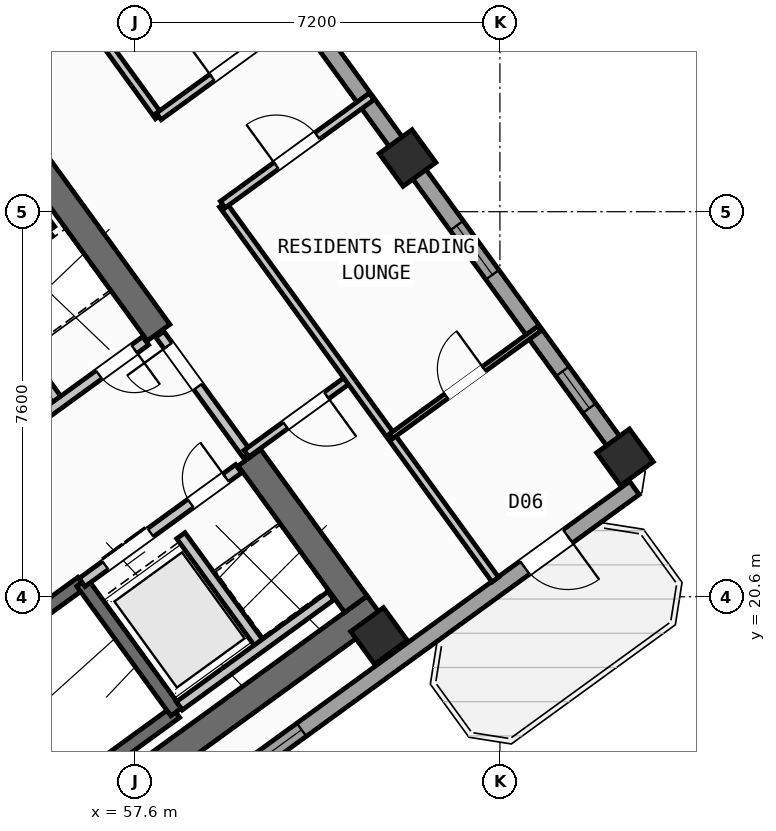
"""IFC4 building model, lengths in metres.
Left out: names, types, materials, properties, quantities, classifications, styles, units other than length and angle.
Written with IfcOpenShell. Run it as: python <this file> out.ifc"""

import sys

from ifc_helpers import new_model, si_unit, direction, frame, frame_2d, origin, origin_2d, place, context, subcontext, project, spatial, rectangle, hollow_rectangle, extrude, source, transform, mapped, element, fill, save


model = new_model("IFC4")
c1 = context("Model", 3, precision=1e-05, world=origin(), true_north=direction((0.0, 1.0)))
c2 = subcontext(c1, "Body", "Model", "MODEL_VIEW")
j1 = project(units=[si_unit("LENGTHUNIT", "METRE"), si_unit("PLANEANGLEUNIT", "RADIAN")], contexts=[c1])
p1 = place(None, origin())
s1 = spatial("IfcSite", under=j1, at=p1, CompositionType="ELEMENT")
p2 = place(p1, origin())
s2 = spatial("IfcBuilding", under=s1, at=p2, CompositionType="ELEMENT")
p3 = place(p2, frame((0.0, 0.0, 191.4)))
s3 = spatial("IfcBuildingStorey", under=s2, at=p3, CompositionType="ELEMENT", Elevation=191.4)
p4 = place(p3, frame((52.359, 13.14, 0.0), z_axis=(0.0, 0.0, 1.0), x_axis=(0.809014896919, 0.587788139183, 0.0)))
e1 = element("IfcWall", 1, at=p4, inside=s3, PredefinedType="SHEAR", context=c2, shape_type="SweptSolid", body=[
    extrude(rectangle(XDim=12.34, YDim=0.55, at=frame_2d((6.17, 0.0))), origin(), (0.0, 0.0, 1.0), 3.32),
])
p5 = place(p3, frame((61.958, 20.454, 0.0), z_axis=(0.0, 0.0, 1.0), x_axis=(-0.587802113096, 0.809004744015, 0.0)))
e2 = element("IfcWall", 2, at=p5, inside=s3, PredefinedType="SHEAR", context=c2, shape_type="SweptSolid", body=[
    extrude(rectangle(XDim=3.575, YDim=0.55, at=frame_2d((1.788, 0.0))), origin(), (0.0, 0.0, 1.0), 3.32),
])
p6 = place(p3, frame((58.064, 25.813, 0.0), z_axis=(0.0, 0.0, 1.0), x_axis=(-0.587764933797, 0.809031756236, 0.0)))
e3 = element("IfcWall", 3, at=p6, inside=s3, PredefinedType="SHEAR", context=c2, shape_type="SweptSolid", body=[
    extrude(rectangle(XDim=6.425, YDim=0.55, at=frame_2d((3.212, 0.0))), origin(), (0.0, 0.0, 1.0), 3.32),
])
m1 = source(origin(), c2, "Body", "SweptSolid", [
    extrude(hollow_rectangle(XDim=0.8, YDim=0.8, WallThickness=0.032, at=origin_2d()), origin(), (0.0, 0.0, 1.0), 3.6),
])
for number, where, z_axis, x_axis in (
    (4, (62.414, 19.827, 0.0), (0.0, 0.0, 1.0), (0.809, 0.588, 0.0)),
    (5, (67.268, 23.354, 0.0), (0.0, 0.0, 1.0), (0.809, 0.588, 0.0)),
    (6, (62.977, 29.259, 0.0), (0.0, 0.0, 1.0), (0.809, 0.588, 0.0)),
):
    element("IfcColumn", number, at=place(p3, frame(where, z_axis=z_axis, x_axis=x_axis)), inside=s3, PredefinedType="COLUMN", context=c2, shape_type="MappedRepresentation", body=[
        mapped(m1, transform((0.0, 0.0, 0.0), scale=1.0)),
    ])
p7 = place(p3, frame((54.81, 40.5, 0.0), z_axis=(0.0, 0.0, 1.0), x_axis=(0.587783625747, -0.809018176127, 0.0)))
e7 = element("IfcWall", 7, at=p7, inside=s3, PredefinedType="STANDARD", context=c2, shape_type="SweptSolid", body=[
    extrude(rectangle(XDim=21.587, YDim=0.32, at=frame_2d((10.794, 0.0))), origin(), (0.0, 0.0, 1.0), 2.795),
])
p8 = place(p7, frame((1.328, 0.0, 0.85)))
e8 = element("IfcOpeningElement", 8, at=p8, cuts=e7, PredefinedType="OPENING", context=c2, shape_type="SweptSolid", body=[
    extrude(rectangle(XDim=1.8, YDim=1.5, at=frame_2d((0.9, 0.75))), frame((0.0, 0.17, 0.0), z_axis=(0.0, -1.0, 0.0), x_axis=(1.0, 0.0, 0.0)), (0.0, 0.0, 1.0), 0.34),
])
p9 = place(p7, frame((4.695, 0.0, 1.0)))
e9 = element("IfcOpeningElement", 9, at=p9, cuts=e7, PredefinedType="OPENING", context=c2, shape_type="SweptSolid", body=[
    extrude(rectangle(XDim=0.9, YDim=1.25, at=frame_2d((0.45, 0.625))), frame((0.0, 0.17, 0.0), z_axis=(0.0, -1.0, 0.0), x_axis=(1.0, 0.0, 0.0)), (0.0, 0.0, 1.0), 0.34),
])
p10 = place(p7, frame((7.829, 0.0, 0.85)))
e10 = element("IfcOpeningElement", 10, at=p10, cuts=e7, PredefinedType="OPENING", context=c2, shape_type="SweptSolid", body=[
    extrude(rectangle(XDim=1.5, YDim=1.5, at=frame_2d((0.75, 0.75))), frame((0.0, 0.17, 0.0), z_axis=(0.0, -1.0, 0.0), x_axis=(1.0, 0.0, 0.0)), (0.0, 0.0, 1.0), 0.34),
])
p11 = place(p7, frame((15.542, 0.0, 0.95)))
e11 = element("IfcOpeningElement", 11, at=p11, cuts=e7, PredefinedType="OPENING", context=c2, shape_type="SweptSolid", body=[
    extrude(rectangle(XDim=1.2, YDim=1.4, at=frame_2d((0.6, 0.7))), frame((0.0, 0.17, 0.0), z_axis=(0.0, -1.0, 0.0), x_axis=(1.0, 0.0, 0.0)), (0.0, 0.0, 1.0), 0.34),
])
p12 = place(p7, frame((19.097, 0.0, 1.0)))
e12 = element("IfcOpeningElement", 12, at=p12, cuts=e7, PredefinedType="OPENING", context=c2, shape_type="SweptSolid", body=[
    extrude(rectangle(XDim=0.9, YDim=1.25, at=frame_2d((0.45, 0.625))), frame((0.0, 0.17, 0.0), z_axis=(0.0, -1.0, 0.0), x_axis=(1.0, 0.0, 0.0)), (0.0, 0.0, 1.0), 0.34),
])
p13 = place(p3, frame((67.454, 22.747, 0.0), z_axis=(0.0, 0.0, 1.0), x_axis=(-0.809021120468, -0.587779573171, 0.0)))
e13 = element("IfcWall", 13, at=p13, inside=s3, PredefinedType="STANDARD", context=c2, shape_type="SweptSolid", body=[
    extrude(rectangle(XDim=17.588, YDim=0.32, at=frame_2d((8.794, 0.0))), origin(), (0.0, 0.0, 1.0), 3.32),
])
p14 = place(p13, frame((1.624, 0.0, 0.0)))
e14 = element("IfcOpeningElement", 14, at=p14, cuts=e13, PredefinedType="OPENING", context=c2, shape_type="SweptSolid", body=[
    extrude(rectangle(XDim=1.05, YDim=2.15, at=frame_2d((0.525, 1.075))), frame((0.0, 0.17, 0.0), z_axis=(0.0, -1.0, 0.0), x_axis=(1.0, 0.0, 0.0)), (0.0, 0.0, 1.0), 0.34),
])
p15 = place(p13, frame((8.119, 0.0, 0.8)))
e15 = element("IfcOpeningElement", 15, at=p15, cuts=e13, PredefinedType="OPENING", context=c2, shape_type="SweptSolid", body=[
    extrude(rectangle(XDim=2.1, YDim=1.55, at=frame_2d((1.05, 0.775))), frame((0.0, 0.17, 0.0), z_axis=(0.0, -1.0, 0.0), x_axis=(1.0, 0.0, 0.0)), (0.0, 0.0, 1.0), 0.34),
])
p16 = place(p13, frame((13.369, 0.0, 0.8)))
e16 = element("IfcOpeningElement", 16, at=p16, cuts=e13, PredefinedType="OPENING", context=c2, shape_type="SweptSolid", body=[
    extrude(rectangle(XDim=2.1, YDim=1.55, at=frame_2d((1.05, 0.775))), frame((0.0, 0.17, 0.0), z_axis=(0.0, -1.0, 0.0), x_axis=(1.0, 0.0, 0.0)), (0.0, 0.0, 1.0), 0.34),
])
p17 = place(p3, frame((49.863, 23.44, 0.0), z_axis=(0.0, 0.0, 1.0), x_axis=(0.809003474932, 0.587803859759, 0.0)))
e17 = element("IfcWall", 17, at=p17, inside=s3, PredefinedType="SHEAR", context=c2, shape_type="SweptSolid", body=[
    extrude(rectangle(XDim=7.46, YDim=0.26, at=frame_2d((3.73, 0.0))), origin(), (0.0, 0.0, 1.0), 3.32),
])
p18 = place(p17, frame((0.36, 0.0, 0.0)))
e18 = element("IfcOpeningElement", 18, at=p18, cuts=e17, PredefinedType="OPENING", context=c2, shape_type="SweptSolid", body=[
    extrude(rectangle(XDim=0.86, YDim=2.05, at=frame_2d((0.43, 1.025))), frame((0.0, 0.14, 0.0), z_axis=(0.0, -1.0, 0.0), x_axis=(1.0, 0.0, 0.0)), (0.0, 0.0, 1.0), 0.28),
])
p19 = place(p3, frame((55.906, 27.831, 0.0), z_axis=(0.0, 0.0, 1.0), x_axis=(-0.587804123638, 0.809003283204, 0.0)))
e19 = element("IfcWall", 19, at=p19, inside=s3, PredefinedType="SHEAR", context=c2, shape_type="SweptSolid", body=[
    extrude(rectangle(XDim=3.16, YDim=0.26, at=frame_2d((1.58, 0.0))), origin(), (0.0, 0.0, 1.0), 3.32),
])
p20 = place(p3, frame((52.472, 14.013, 0.0), z_axis=(0.0, 0.0, 1.0), x_axis=(0.809028366311, 0.587769599847, 0.0)))
e20 = element("IfcWall", 20, at=p20, inside=s3, PredefinedType="SHEAR", context=c2, shape_type="SweptSolid", body=[
    extrude(rectangle(XDim=7.33, YDim=0.26, at=frame_2d((3.665, 0.0))), origin(), (0.0, 0.0, 1.0), 3.32),
])
p21 = place(p3, frame((50.615, 16.57, 0.0), z_axis=(0.0, 0.0, 1.0), x_axis=(0.809028366311, 0.587769599847, 0.0)))
e21 = element("IfcWall", 21, at=p21, inside=s3, PredefinedType="SHEAR", context=c2, shape_type="SweptSolid", body=[
    extrude(rectangle(XDim=7.33, YDim=0.26, at=frame_2d((3.665, 0.0))), origin(), (0.0, 0.0, 1.0), 3.32),
])
p22 = place(p21, frame((0.22, 0.0, 0.0)))
e22 = element("IfcOpeningElement", 22, at=p22, cuts=e21, PredefinedType="OPENING", context=c2, shape_type="SweptSolid", body=[
    extrude(rectangle(XDim=1.1, YDim=2.1, at=frame_2d((0.55, 1.05))), frame((0.0, 0.14, 0.0), z_axis=(0.0, -1.0, 0.0), x_axis=(1.0, 0.0, 0.0)), (0.0, 0.0, 1.0), 0.28),
])
p23 = place(p3, frame((58.41, 18.327, 0.0), z_axis=(0.0, 0.0, 1.0), x_axis=(-0.58776738483, 0.809029975545, 0.0)))
e23 = element("IfcWall", 23, at=p23, inside=s3, PredefinedType="SHEAR", context=c2, shape_type="SweptSolid", body=[
    extrude(rectangle(XDim=3.16, YDim=0.26, at=frame_2d((1.58, 0.0))), origin(), (0.0, 0.0, 1.0), 3.32),
])
p24 = place(p3, frame((56.553, 20.884, 0.0), z_axis=(0.0, 0.0, 1.0), x_axis=(0.809023564264, 0.58777620951, 0.0)))
e24 = element("IfcWall", 24, at=p24, inside=s3, PredefinedType="STANDARD", context=c2, shape_type="SweptSolid", body=[
    extrude(rectangle(XDim=3.818, YDim=0.2, at=frame_2d((1.909, 0.0))), origin(), (0.0, 0.0, 1.0), 3.31),
])
p25 = place(p24, frame((0.57, 0.0, 0.0)))
e25 = element("IfcOpeningElement", 25, at=p25, cuts=e24, PredefinedType="OPENING", context=c2, shape_type="SweptSolid", body=[
    extrude(rectangle(XDim=1.1, YDim=2.15, at=frame_2d((0.55, 1.075))), frame((0.0, 0.11, 0.0), z_axis=(0.0, -1.0, 0.0), x_axis=(1.0, 0.0, 0.0)), (0.0, 0.0, 1.0), 0.22),
])
p26 = place(p24, frame((2.65, 0.0, 0.0)))
e26 = element("IfcOpeningElement", 26, at=p26, cuts=e24, PredefinedType="OPENING", context=c2, shape_type="SweptSolid", body=[
    extrude(rectangle(XDim=0.86, YDim=2.05, at=frame_2d((0.43, 1.025))), frame((0.0, 0.11, 0.0), z_axis=(0.0, -1.0, 0.0), x_axis=(1.0, 0.0, 0.0)), (0.0, 0.0, 1.0), 0.22),
])
p27 = place(p3, frame((60.067, 19.655, 0.0), z_axis=(0.0, 0.0, 1.0), x_axis=(-0.587800520745, 0.809005900975, 0.0)))
e27 = element("IfcWall", 27, at=p27, inside=s3, PredefinedType="STANDARD", context=c2, shape_type="SweptSolid", body=[
    extrude(rectangle(XDim=2.66, YDim=0.2, at=frame_2d((1.33, 0.0))), origin(), (0.0, 0.0, 1.0), 3.31),
])
p28 = place(p3, frame((58.472, 18.447, 0.0), z_axis=(0.0, 0.0, 1.0), x_axis=(0.809018631237, 0.587782999339, 0.0)))
e28 = element("IfcWall", 28, at=p28, inside=s3, PredefinedType="STANDARD", context=c2, shape_type="SweptSolid", body=[
    extrude(rectangle(XDim=3.698, YDim=0.2, at=frame_2d((1.849, 0.0))), origin(), (0.0, 0.0, 1.0), 3.31),
])
p29 = place(p3, frame((56.111, 24.419, 0.0), z_axis=(0.0, 0.0, 1.0), x_axis=(-0.58777848983, 0.809021907548, 0.0)))
e29 = element("IfcWall", 29, at=p29, inside=s3, PredefinedType="STANDARD", context=c2, shape_type="SweptSolid", body=[
    extrude(rectangle(XDim=2.88, YDim=0.2, at=frame_2d((1.44, 0.0))), origin(), (0.0, 0.0, 1.0), 3.31),
])
p30 = place(p3, frame((53.425, 22.468, 0.0), z_axis=(0.0, 0.0, 1.0), x_axis=(0.809024377198, 0.587775090574, 0.0)))
e30 = element("IfcWall", 30, at=p30, inside=s3, PredefinedType="STANDARD", context=c2, shape_type="SweptSolid", body=[
    extrude(rectangle(XDim=5.418, YDim=0.2, at=frame_2d((2.709, 0.0))), origin(), (0.0, 0.0, 1.0), 3.31),
])
p31 = place(p30, frame((4.28, 0.0, 0.0)))
e31 = element("IfcOpeningElement", 31, at=p31, cuts=e30, PredefinedType="OPENING", context=c2, shape_type="SweptSolid", body=[
    extrude(rectangle(XDim=0.86, YDim=2.05, at=frame_2d((0.43, 1.025))), frame((0.0, 0.11, 0.0), z_axis=(0.0, -1.0, 0.0), x_axis=(1.0, 0.0, 0.0)), (0.0, 0.0, 1.0), 0.22),
])
p32 = place(p30, frame((1.45, 0.0, 0.0)))
e32 = element("IfcOpeningElement", 32, at=p32, cuts=e30, PredefinedType="OPENING", context=c2, shape_type="SweptSolid", body=[
    extrude(rectangle(XDim=0.86, YDim=2.05, at=frame_2d((0.43, 1.025))), frame((0.0, 0.11, 0.0), z_axis=(0.0, -1.0, 0.0), x_axis=(1.0, 0.0, 0.0)), (0.0, 0.0, 1.0), 0.22),
])
p33 = place(p3, frame((59.827, 23.386, 0.0), z_axis=(0.0, 0.0, 1.0), x_axis=(-0.587803840107, 0.809003489211, 0.0)))
e33 = element("IfcWall", 33, at=p33, inside=s3, PredefinedType="STANDARD", context=c2, shape_type="SweptSolid", body=[
    extrude(rectangle(XDim=2.96, YDim=0.2, at=frame_2d((1.48, 0.0))), origin(), (0.0, 0.0, 1.0), 3.31),
])
p34 = place(p33, frame((1.68, 0.0, 0.0)))
e34 = element("IfcOpeningElement", 34, at=p34, cuts=e33, PredefinedType="OPENING", context=c2, shape_type="SweptSolid", body=[
    extrude(rectangle(XDim=1.0, YDim=2.1, at=frame_2d((0.5, 1.05))), frame((0.0, 0.11, 0.0), z_axis=(0.0, -1.0, 0.0), x_axis=(1.0, 0.0, 0.0)), (0.0, 0.0, 1.0), 0.22),
])
p35 = place(p3, frame((59.798, 23.427, 0.0), z_axis=(0.0, 0.0, 1.0), x_axis=(0.809034604122, 0.587761013791, 0.0)))
e35 = element("IfcWall", 35, at=p35, inside=s3, PredefinedType="PARTITIONING", context=c2, shape_type="SweptSolid", body=[
    extrude(rectangle(XDim=2.51, YDim=0.16, at=frame_2d((1.255, 0.0))), origin(), (0.0, 0.0, 1.0), 3.31),
])
p36 = place(p35, frame((0.95, 0.0, 0.0)))
e36 = element("IfcOpeningElement", 36, at=p36, cuts=e35, PredefinedType="OPENING", context=c2, shape_type="SweptSolid", body=[
    extrude(rectangle(XDim=1.0, YDim=2.1, at=frame_2d((0.5, 1.05))), frame((0.0, 0.09, 0.0), z_axis=(0.0, -1.0, 0.0), x_axis=(1.0, 0.0, 0.0)), (0.0, 0.0, 1.0), 0.18),
])
p37 = place(p3, frame((64.709, 20.938, 0.0), z_axis=(0.0, 0.0, 1.0), x_axis=(-0.587776590479, 0.80902328748, 0.0)))
e37 = element("IfcWall", 37, at=p37, inside=s3, PredefinedType="PARTITIONING", context=c2, shape_type="SweptSolid", body=[
    extrude(rectangle(XDim=9.15, YDim=0.16, at=frame_2d((4.575, 0.0))), origin(), (0.0, 0.0, 1.0), 3.31),
])
p38 = place(p3, frame((58.067, 30.08, 0.0), z_axis=(0.0, 0.0, 1.0), x_axis=(-0.587787785243, 0.809015154073, 0.0)))
e38 = element("IfcWall", 38, at=p38, inside=s3, PredefinedType="PARTITIONING", context=c2, shape_type="SweptSolid", body=[
    extrude(rectangle(XDim=10.4, YDim=0.16, at=frame_2d((5.2, 0.0))), origin(), (0.0, 0.0, 1.0), 3.31),
])
p39 = place(p3, frame((59.331, 28.341, 0.0), z_axis=(0.0, 0.0, 1.0), x_axis=(0.809003564202, 0.587803736896, 0.0)))
e39 = element("IfcWall", 39, at=p39, inside=s3, PredefinedType="PARTITIONING", context=c2, shape_type="SweptSolid", body=[
    extrude(rectangle(XDim=3.63, YDim=0.16, at=frame_2d((1.815, 0.0))), origin(), (0.0, 0.0, 1.0), 3.31),
])
p40 = place(p39, frame((1.305, 0.0, 0.0)))
e40 = element("IfcOpeningElement", 40, at=p40, cuts=e39, PredefinedType="OPENING", context=c2, shape_type="SweptSolid", body=[
    extrude(rectangle(XDim=1.0, YDim=2.1, at=frame_2d((0.5, 1.05))), frame((0.0, 0.09, 0.0), z_axis=(0.0, -1.0, 0.0), x_axis=(1.0, 0.0, 0.0)), (0.0, 0.0, 1.0), 0.18),
])
p41 = place(p3, frame((58.067, 30.08, 0.0), z_axis=(0.0, 0.0, 1.0), x_axis=(0.809012309495, 0.587791700422, 0.0)))
e41 = element("IfcWall", 41, at=p41, inside=s3, PredefinedType="PARTITIONING", context=c2, shape_type="SweptSolid", body=[
    extrude(rectangle(XDim=3.63, YDim=0.16, at=frame_2d((1.815, 0.0))), origin(), (0.0, 0.0, 1.0), 3.31),
])
p42 = place(p41, frame((1.305, 0.0, 0.0)))
e42 = element("IfcOpeningElement", 42, at=p42, cuts=e41, PredefinedType="OPENING", context=c2, shape_type="SweptSolid", body=[
    extrude(rectangle(XDim=1.0, YDim=2.1, at=frame_2d((0.5, 1.05))), frame((0.0, 0.09, 0.0), z_axis=(0.0, -1.0, 0.0), x_axis=(1.0, 0.0, 0.0)), (0.0, 0.0, 1.0), 0.18),
])
p43 = place(p3, frame((62.653, 23.768, 0.0), z_axis=(0.0, 0.0, 1.0), x_axis=(0.809037198293, 0.58775744298, 0.0)))
e43 = element("IfcWall", 43, at=p43, inside=s3, PredefinedType="PARTITIONING", context=c2, shape_type="SweptSolid", body=[
    extrude(rectangle(XDim=3.61, YDim=0.11, at=frame_2d((1.805, 0.0))), origin(), (0.0, 0.0, 1.0), 3.31),
])
p44 = place(p43, frame((1.345, 0.0, 0.0)))
e44 = element("IfcOpeningElement", 44, at=p44, cuts=e43, PredefinedType="OPENING", context=c2, shape_type="SweptSolid", body=[
    extrude(rectangle(XDim=0.92, YDim=2.08, at=frame_2d((0.46, 1.04))), frame((0.0, 0.065, 0.0), z_axis=(0.0, -1.0, 0.0), x_axis=(1.0, 0.0, 0.0)), (0.0, 0.0, 1.0), 0.13),
])
m2 = source(origin(), c2, "Body", "SweptSolid", [
    extrude(rectangle(XDim=1.05, YDim=2.15, at=frame_2d((0.525, 1.075))), frame((0.0, 0.025, 0.0), z_axis=(0.0, -1.0, 0.0), x_axis=(1.0, 0.0, 0.0)), (0.0, 0.0, 1.0), 0.05),
])
p45 = place(p14, origin())
e45 = element("IfcDoor", 45, at=p45, inside=s3, OperationType="SINGLE_SWING_LEFT", PredefinedType="DOOR", context=c2, shape_type="MappedRepresentation", body=[
    mapped(m2, transform((0.0, 0.0, 0.0), scale=1.0)),
])
fill(e14, e45)
m3 = source(origin(), c2, "Body", "SweptSolid", [
    extrude(rectangle(XDim=1.2, YDim=1.4, at=frame_2d((0.6, 0.7))), frame((0.0, 0.03, 0.0), z_axis=(0.0, -1.0, 0.0), x_axis=(1.0, 0.0, 0.0)), (0.0, 0.0, 1.0), 0.06),
])
p46 = place(p11, origin())
e46 = element("IfcWindow", 46, at=p46, inside=s3, PartitioningType="SINGLE_PANEL", PredefinedType="WINDOW", context=c2, shape_type="MappedRepresentation", body=[
    mapped(m3, transform((0.0, 0.0, 0.0), scale=1.0)),
])
fill(e11, e46)
m4 = source(origin(), c2, "Body", "SweptSolid", [
    extrude(rectangle(XDim=0.9, YDim=1.25, at=frame_2d((0.45, 0.625))), frame((0.0, 0.03, 0.0), z_axis=(0.0, -1.0, 0.0), x_axis=(1.0, 0.0, 0.0)), (0.0, 0.0, 1.0), 0.06),
])
p47 = place(p12, origin())
e47 = element("IfcWindow", 47, at=p47, inside=s3, PartitioningType="SINGLE_PANEL", PredefinedType="WINDOW", context=c2, shape_type="MappedRepresentation", body=[
    mapped(m4, transform((0.0, 0.0, 0.0), scale=1.0)),
])
fill(e12, e47)
m5 = source(origin(), c2, "Body", "SweptSolid", [
    extrude(rectangle(XDim=2.1, YDim=1.55, at=frame_2d((1.05, 0.775))), frame((0.0, 0.03, 0.0), z_axis=(0.0, -1.0, 0.0), x_axis=(1.0, 0.0, 0.0)), (0.0, 0.0, 1.0), 0.06),
])
p48 = place(p15, origin())
e48 = element("IfcWindow", 48, at=p48, inside=s3, PartitioningType="SINGLE_PANEL", PredefinedType="WINDOW", context=c2, shape_type="MappedRepresentation", body=[
    mapped(m5, transform((0.0, 0.0, 0.0), scale=1.0)),
])
fill(e15, e48)
m6 = source(origin(), c2, "Body", "SweptSolid", [
    extrude(rectangle(XDim=1.1, YDim=2.15, at=frame_2d((0.55, 1.075))), frame((0.0, 0.025, 0.0), z_axis=(0.0, -1.0, 0.0), x_axis=(1.0, 0.0, 0.0)), (0.0, 0.0, 1.0), 0.05),
])
p49 = place(p25, origin())
e49 = element("IfcDoor", 49, at=p49, inside=s3, OperationType="DOUBLE_DOOR_SLIDING", PredefinedType="DOOR", context=c2, shape_type="MappedRepresentation", body=[
    mapped(m6, transform((0.0, 0.0, 0.0), scale=1.0)),
])
fill(e25, e49)
m7 = source(origin(), c2, "Body", "SweptSolid", [
    extrude(rectangle(XDim=0.86, YDim=2.05, at=frame_2d((0.43, 1.025))), frame((0.0, 0.025, 0.0), z_axis=(0.0, -1.0, 0.0), x_axis=(1.0, 0.0, 0.0)), (0.0, 0.0, 1.0), 0.05),
])
p50 = place(p26, origin())
e50 = element("IfcDoor", 50, at=p50, inside=s3, OperationType="SINGLE_SWING_RIGHT", PredefinedType="DOOR", context=c2, shape_type="MappedRepresentation", body=[
    mapped(m7, transform((0.0, 0.0, 0.0), scale=1.0)),
])
fill(e26, e50)
p51 = place(p31, frame((0.86, 0.0, 0.0), z_axis=(0.0, 0.0, 1.0), x_axis=(-1.0, 0.0, 0.0)))
e51 = element("IfcDoor", 51, at=p51, inside=s3, OperationType="SINGLE_SWING_LEFT", PredefinedType="DOOR", context=c2, shape_type="MappedRepresentation", body=[
    mapped(m7, transform((0.0, 0.0, 0.0), scale=1.0)),
])
fill(e31, e51)
m8 = source(origin(), c2, "Body", "SweptSolid", [
    extrude(rectangle(XDim=1.0, YDim=2.1, at=frame_2d((0.5, 1.05))), frame((0.0, 0.025, 0.0), z_axis=(0.0, -1.0, 0.0), x_axis=(1.0, 0.0, 0.0)), (0.0, 0.0, 1.0), 0.05),
])
p52 = place(p36, frame((1.0, 0.0, 0.0), z_axis=(0.0, 0.0, 1.0), x_axis=(-1.0, 0.0, 0.0)))
e52 = element("IfcDoor", 52, at=p52, inside=s3, OperationType="SINGLE_SWING_LEFT", PredefinedType="DOOR", context=c2, shape_type="MappedRepresentation", body=[
    mapped(m8, transform((0.0, 0.0, 0.0), scale=1.0)),
])
fill(e36, e52)
p53 = place(p34, origin())
e53 = element("IfcDoor", 53, at=p53, inside=s3, OperationType="SINGLE_SWING_RIGHT", PredefinedType="DOOR", context=c2, shape_type="MappedRepresentation", body=[
    mapped(m8, transform((0.0, 0.0, 0.0), scale=1.0)),
])
fill(e34, e53)
p54 = place(p42, origin())
e54 = element("IfcDoor", 54, at=p54, inside=s3, OperationType="SINGLE_SWING_LEFT", PredefinedType="DOOR", context=c2, shape_type="MappedRepresentation", body=[
    mapped(m8, transform((0.0, 0.0, 0.0), scale=1.0)),
])
fill(e42, e54)
p55 = place(p40, origin())
e55 = element("IfcDoor", 55, at=p55, inside=s3, OperationType="SINGLE_SWING_LEFT", PredefinedType="DOOR", context=c2, shape_type="MappedRepresentation", body=[
    mapped(m8, transform((0.0, 0.0, 0.0), scale=1.0)),
])
fill(e40, e55)
m9 = source(origin(), c2, "Body", "SweptSolid", [
    extrude(rectangle(XDim=0.92, YDim=2.08, at=frame_2d((0.46, 1.04))), frame((0.0, 0.025, 0.0), z_axis=(0.0, -1.0, 0.0), x_axis=(1.0, 0.0, 0.0)), (0.0, 0.0, 1.0), 0.05),
])
p56 = place(p44, origin())
e56 = element("IfcDoor", 56, at=p56, inside=s3, OperationType="SINGLE_SWING_RIGHT", PredefinedType="DOOR", context=c2, shape_type="MappedRepresentation", body=[
    mapped(m9, transform((0.0, 0.0, 0.0), scale=1.0)),
])
fill(e44, e56)
save(model, sys.argv[1])
